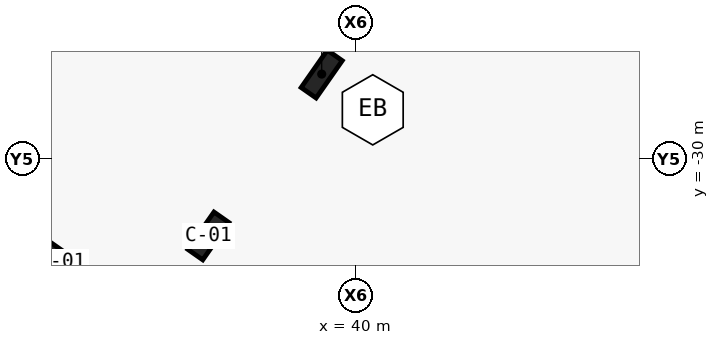
"""IFC4 building model, lengths in metres.
Left out: names, types, materials, properties, quantities, classifications, styles, units other than length and angle.
Written with IfcOpenShell. Run it as: python <this file> out.ifc"""

import sys

from ifc_helpers import new_model, si_unit, direction, frame, origin, origin_2d, place, context, subcontext, project, spatial, rectangle, extrude, element, save


model = new_model("IFC4")
c1 = context("Model", 3, precision=1e-05, world=origin(), true_north=direction((0.0, 1.0)))
c2 = subcontext(c1, "Body", "Model", "MODEL_VIEW")
j1 = project(units=[si_unit("LENGTHUNIT", "METRE"), si_unit("PLANEANGLEUNIT", "RADIAN")], contexts=[c1])
p1 = place(None, origin())
s1 = spatial("IfcSite", under=j1, at=p1, CompositionType="ELEMENT")
p2 = place(p1, origin())
s2 = spatial("IfcBuilding", under=s1, at=p2, CompositionType="ELEMENT")
p3 = place(p2, frame((0.0, 0.0, -4.5)))
s3 = spatial("IfcBuildingStorey", under=s2, at=p3, CompositionType="ELEMENT", Elevation=-4.5)
for number, where, z_axis, x_axis in (
    (1, (30.336, -33.388, 0.0), (0.0, 0.0, 1.0), (0.819, -0.574, 0.0)),
    (2, (35.14, -32.541, 0.0), (0.0, 0.0, 1.0), (0.574, 0.819, 0.0)),
    (3, (38.869, -27.216, 0.0), (0.0, 0.0, 1.0), (0.574, 0.819, 0.0)),
):
    element("IfcColumn", number, at=place(p3, frame(where, z_axis=z_axis, x_axis=x_axis)), inside=s3, PredefinedType="COLUMN", context=c2, shape_type="SweptSolid", body=[
        extrude(rectangle(XDim=1.5, YDim=0.6, at=origin_2d()), origin(), (0.0, 0.0, 1.0), 4.5),
    ])
save(model, sys.argv[1])
